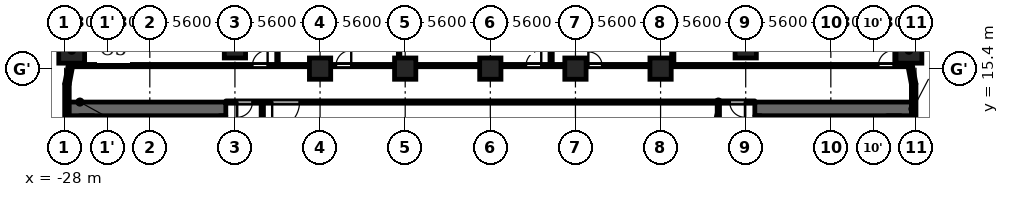
"""IFC4 building model, lengths in metres.
Left out: names, types, materials, properties, quantities, classifications, styles, units other than length and angle.
Written with IfcOpenShell. Run it as: python <this file> out.ifc"""

import sys

from ifc_helpers import new_model, si_unit, direction, frame, frame_2d, origin, origin_2d, place, context, subcontext, project, spatial, rectangle, extrude, element, fill, save


model = new_model("IFC4")
c1 = context("Model", 3, precision=1e-05, world=origin(), true_north=direction((0.0, 1.0)))
c2 = subcontext(c1, "Body", "Model", "MODEL_VIEW")
j1 = project(units=[si_unit("LENGTHUNIT", "METRE"), si_unit("PLANEANGLEUNIT", "RADIAN")], contexts=[c1])
p1 = place(None, origin())
s1 = spatial("IfcSite", under=j1, at=p1, CompositionType="ELEMENT")
p2 = place(p1, origin())
s2 = spatial("IfcBuilding", under=s1, at=p2, CompositionType="ELEMENT")
p3 = place(p2, frame((0.0, 0.0, 16.1)))
s3 = spatial("IfcBuildingStorey", under=s2, at=p3, CompositionType="ELEMENT", Elevation=16.1)
for number, where, z_axis, x_axis in (
    (1, (27.538, 16.609, 0.0), (0.0, 0.0, 1.0), (1.0, 0.0, 0.0)),
    (2, (-27.538, 16.609, 0.0), (0.0, 0.0, 1.0), (1.0, 0.0, 0.0)),
):
    element("IfcColumn", number, at=place(p3, frame(where, z_axis=z_axis, x_axis=x_axis)), inside=s3, PredefinedType="COLUMN", context=c2, shape_type="SweptSolid", body=[
        extrude(rectangle(XDim=1.7, YDim=1.7, at=origin_2d()), origin(), (0.0, 0.0, 1.0), 4.8),
    ])
for number, where, z_axis, x_axis in (
    (3, (-16.8, 16.8, 0.0), (0.0, 0.0, 1.0), (1.0, 0.0, 0.0)),
    (4, (16.8, 16.8, 0.0), (0.0, 0.0, 1.0), (1.0, 0.0, 0.0)),
    (5, (-11.2, 15.4, 0.0), (0.0, 0.0, 1.0), (1.0, 0.0, 0.0)),
    (6, (-5.6, 15.4, 0.0), (0.0, 0.0, 1.0), (1.0, 0.0, 0.0)),
    (7, (0.0, 15.4, 0.0), (0.0, 0.0, 1.0), (1.0, 0.0, 0.0)),
    (8, (5.6, 15.4, 0.0), (0.0, 0.0, 1.0), (1.0, 0.0, 0.0)),
    (9, (11.2, 15.4, 0.0), (0.0, 0.0, 1.0), (1.0, 0.0, 0.0)),
):
    element("IfcColumn", number, at=place(p3, frame(where, z_axis=z_axis, x_axis=x_axis)), inside=s3, PredefinedType="COLUMN", context=c2, shape_type="SweptSolid", body=[
        extrude(rectangle(XDim=1.4, YDim=1.4, at=origin_2d()), origin(), (0.0, 0.0, 1.0), 4.8),
    ])
p4 = place(p3, frame((27.85, 12.05, 0.0), z_axis=(0.0, 0.0, 1.0), x_axis=(0.0, 1.0, 0.0)))
e10 = element("IfcWall", 10, at=p4, inside=s3, PredefinedType="SOLIDWALL", context=c2, shape_type="SweptSolid", body=[
    extrude(rectangle(XDim=2.35, YDim=0.3, at=frame_2d((1.175, 0.0))), origin(), (0.0, 0.0, 1.0), 3.55),
])
for number, where, z_axis, x_axis in (
    (11, (27.853, 14.372, 0.0), (0.0, 0.0, 1.0), (-0.187, 0.982, 0.0)),
    (12, (-27.589, 15.753, 0.0), (0.0, 0.0, 1.0), (-0.187, -0.982, 0.0)),
):
    element("IfcWall", number, at=place(p3, frame(where, z_axis=z_axis, x_axis=x_axis)), inside=s3, PredefinedType="SOLIDWALL", context=c2, shape_type="SweptSolid", body=[
        extrude(rectangle(XDim=1.406, YDim=0.3, at=frame_2d((0.703, 0.0))), origin(), (0.0, 0.0, 1.0), 3.55),
    ])
p5 = place(p3, frame((-27.85, 14.4, 0.0), z_axis=(0.0, 0.0, 1.0), x_axis=(0.0, -1.0, 0.0)))
e13 = element("IfcWall", 13, at=p5, inside=s3, PredefinedType="SOLIDWALL", context=c2, shape_type="SweptSolid", body=[
    extrude(rectangle(XDim=2.35, YDim=0.3, at=frame_2d((1.175, 0.0))), origin(), (0.0, 0.0, 1.0), 3.55),
])
p6 = place(p3, frame((-17.4, 12.75, 0.0), z_axis=(0.0, 0.0, 1.0), x_axis=(-1.0, 0.0, 0.0)))
e14 = element("IfcWall", 14, at=p6, inside=s3, PredefinedType="SHEAR", context=c2, shape_type="SweptSolid", body=[
    extrude(rectangle(XDim=10.4, YDim=0.9, at=frame_2d((5.2, 0.0))), origin(), (0.0, 0.0, 1.0), 4.45),
])
p7 = place(p3, frame((-17.6, -12.3, 0.0), z_axis=(0.0, 0.0, 1.0), x_axis=(0.0, 1.0, 0.0)))
e15 = element("IfcWall", 15, at=p7, inside=s3, PredefinedType="SHEAR", context=c2, shape_type="SweptSolid", body=[
    extrude(rectangle(XDim=24.6, YDim=0.4, at=frame_2d((12.3, 0.0))), origin(), (0.0, 0.0, 1.0), 4.45),
])
p8 = place(p7, frame((6.0, 0.0, 0.0)))
e16 = element("IfcOpeningElement", 16, at=p8, cuts=e15, PredefinedType="OPENING", context=c2, shape_type="SweptSolid", body=[
    extrude(rectangle(XDim=1.1, YDim=2.1, at=frame_2d((0.55, 1.05))), frame((0.0, 0.21, 0.0), z_axis=(0.0, -1.0, 0.0), x_axis=(1.0, 0.0, 0.0)), (0.0, 0.0, 1.0), 0.42),
])
p9 = place(p7, frame((8.4, 0.0, 0.0)))
e17 = element("IfcOpeningElement", 17, at=p9, cuts=e15, PredefinedType="OPENING", context=c2, shape_type="SweptSolid", body=[
    extrude(rectangle(XDim=1.1, YDim=2.1, at=frame_2d((0.55, 1.05))), frame((0.0, 0.21, 0.0), z_axis=(0.0, -1.0, 0.0), x_axis=(1.0, 0.0, 0.0)), (0.0, 0.0, 1.0), 0.42),
])
p10 = place(p7, frame((10.8, 0.0, 0.0)))
e18 = element("IfcOpeningElement", 18, at=p10, cuts=e15, PredefinedType="OPENING", context=c2, shape_type="SweptSolid", body=[
    extrude(rectangle(XDim=1.1, YDim=2.1, at=frame_2d((0.55, 1.05))), frame((0.0, 0.21, 0.0), z_axis=(0.0, -1.0, 0.0), x_axis=(1.0, 0.0, 0.0)), (0.0, 0.0, 1.0), 0.42),
])
p11 = place(p7, frame((16.75, 0.0, 0.0)))
e19 = element("IfcOpeningElement", 19, at=p11, cuts=e15, PredefinedType="OPENING", context=c2, shape_type="SweptSolid", body=[
    extrude(rectangle(XDim=0.9, YDim=2.1, at=frame_2d((0.45, 1.05))), frame((0.0, 0.21, 0.0), z_axis=(0.0, -1.0, 0.0), x_axis=(1.0, 0.0, 0.0)), (0.0, 0.0, 1.0), 0.42),
])
p12 = place(p7, frame((22.8, 0.0, 0.0)))
e20 = element("IfcOpeningElement", 20, at=p12, cuts=e15, PredefinedType="OPENING", context=c2, shape_type="SweptSolid", body=[
    extrude(rectangle(XDim=1.1, YDim=2.1, at=frame_2d((0.55, 1.05))), frame((0.0, 0.21, 0.0), z_axis=(0.0, -1.0, 0.0), x_axis=(1.0, 0.0, 0.0)), (0.0, 0.0, 1.0), 0.42),
])
p13 = place(p7, frame((0.7, 0.0, 0.0)))
e21 = element("IfcOpeningElement", 21, at=p13, cuts=e15, PredefinedType="OPENING", context=c2, shape_type="SweptSolid", body=[
    extrude(rectangle(XDim=1.1, YDim=2.1, at=frame_2d((0.55, 1.05))), frame((0.0, 0.21, 0.0), z_axis=(0.0, -1.0, 0.0), x_axis=(1.0, 0.0, 0.0)), (0.0, 0.0, 1.0), 0.42),
])
p14 = place(p7, frame((12.775, 0.0, 0.0)))
e22 = element("IfcOpeningElement", 22, at=p14, cuts=e15, PredefinedType="OPENING", context=c2, shape_type="SweptSolid", body=[
    extrude(rectangle(XDim=1.8, YDim=2.1, at=frame_2d((0.9, 1.05))), frame((0.0, 0.21, 0.0), z_axis=(0.0, -1.0, 0.0), x_axis=(1.0, 0.0, 0.0)), (0.0, 0.0, 1.0), 0.42),
])
p15 = place(p3, frame((-26.55, -12.3, 0.0), z_axis=(0.0, 0.0, 1.0), x_axis=(0.0, 1.0, 0.0)))
e23 = element("IfcWall", 23, at=p15, inside=s3, PredefinedType="SHEAR", context=c2, shape_type="SweptSolid", body=[
    extrude(rectangle(XDim=24.6, YDim=0.9, at=frame_2d((12.3, 0.0))), origin(), (0.0, 0.0, 1.0), 4.45),
])
p16 = place(p3, frame((-23.55, 9.8, 0.0), z_axis=(0.0, 0.0, 1.0), x_axis=(0.0, 1.0, 0.0)))
e24 = element("IfcWall", 24, at=p16, inside=s3, PredefinedType="PARTITIONING", context=c2, shape_type="SweptSolid", body=[
    extrude(rectangle(XDim=2.5, YDim=0.2, at=frame_2d((1.25, 0.0))), origin(), (0.0, 0.0, 1.0), 4.45),
])
p17 = place(p16, frame((0.8, 0.0, 0.0)))
e25 = element("IfcOpeningElement", 25, at=p17, cuts=e24, PredefinedType="OPENING", context=c2, shape_type="SweptSolid", body=[
    extrude(rectangle(XDim=0.9, YDim=2.1, at=frame_2d((0.45, 1.05))), frame((0.0, 0.11, 0.0), z_axis=(0.0, -1.0, 0.0), x_axis=(1.0, 0.0, 0.0)), (0.0, 0.0, 1.0), 0.22),
])
p18 = place(p3, frame((17.4, 12.75, 0.0), z_axis=(0.0, 0.0, 1.0), x_axis=(1.0, 0.0, 0.0)))
e26 = element("IfcWall", 26, at=p18, inside=s3, PredefinedType="SHEAR", context=c2, shape_type="SweptSolid", body=[
    extrude(rectangle(XDim=10.4, YDim=0.9, at=frame_2d((5.2, 0.0))), origin(), (0.0, 0.0, 1.0), 4.45),
])
p19 = place(p3, frame((17.6, -12.3, 0.0), z_axis=(0.0, 0.0, 1.0), x_axis=(0.0, 1.0, 0.0)))
e27 = element("IfcWall", 27, at=p19, inside=s3, PredefinedType="SHEAR", context=c2, shape_type="SweptSolid", body=[
    extrude(rectangle(XDim=24.6, YDim=0.4, at=frame_2d((12.3, 0.0))), origin(), (0.0, 0.0, 1.0), 4.45),
])
p20 = place(p19, frame((6.0, 0.0, 0.0)))
e28 = element("IfcOpeningElement", 28, at=p20, cuts=e27, PredefinedType="OPENING", context=c2, shape_type="SweptSolid", body=[
    extrude(rectangle(XDim=1.1, YDim=2.1, at=frame_2d((0.55, 1.05))), frame((0.0, 0.21, 0.0), z_axis=(0.0, -1.0, 0.0), x_axis=(1.0, 0.0, 0.0)), (0.0, 0.0, 1.0), 0.42),
])
p21 = place(p19, frame((8.4, 0.0, 0.0)))
e29 = element("IfcOpeningElement", 29, at=p21, cuts=e27, PredefinedType="OPENING", context=c2, shape_type="SweptSolid", body=[
    extrude(rectangle(XDim=1.1, YDim=2.1, at=frame_2d((0.55, 1.05))), frame((0.0, 0.21, 0.0), z_axis=(0.0, -1.0, 0.0), x_axis=(1.0, 0.0, 0.0)), (0.0, 0.0, 1.0), 0.42),
])
p22 = place(p19, frame((10.8, 0.0, 0.0)))
e30 = element("IfcOpeningElement", 30, at=p22, cuts=e27, PredefinedType="OPENING", context=c2, shape_type="SweptSolid", body=[
    extrude(rectangle(XDim=1.1, YDim=2.1, at=frame_2d((0.55, 1.05))), frame((0.0, 0.21, 0.0), z_axis=(0.0, -1.0, 0.0), x_axis=(1.0, 0.0, 0.0)), (0.0, 0.0, 1.0), 0.42),
])
p23 = place(p19, frame((16.75, 0.0, 0.0)))
e31 = element("IfcOpeningElement", 31, at=p23, cuts=e27, PredefinedType="OPENING", context=c2, shape_type="SweptSolid", body=[
    extrude(rectangle(XDim=0.9, YDim=2.1, at=frame_2d((0.45, 1.05))), frame((0.0, 0.21, 0.0), z_axis=(0.0, -1.0, 0.0), x_axis=(1.0, 0.0, 0.0)), (0.0, 0.0, 1.0), 0.42),
])
p24 = place(p19, frame((22.8, 0.0, 0.0)))
e32 = element("IfcOpeningElement", 32, at=p24, cuts=e27, PredefinedType="OPENING", context=c2, shape_type="SweptSolid", body=[
    extrude(rectangle(XDim=1.1, YDim=2.1, at=frame_2d((0.55, 1.05))), frame((0.0, 0.21, 0.0), z_axis=(0.0, -1.0, 0.0), x_axis=(1.0, 0.0, 0.0)), (0.0, 0.0, 1.0), 0.42),
])
p25 = place(p19, frame((0.7, 0.0, 0.0)))
e33 = element("IfcOpeningElement", 33, at=p25, cuts=e27, PredefinedType="OPENING", context=c2, shape_type="SweptSolid", body=[
    extrude(rectangle(XDim=1.1, YDim=2.1, at=frame_2d((0.55, 1.05))), frame((0.0, 0.21, 0.0), z_axis=(0.0, -1.0, 0.0), x_axis=(1.0, 0.0, 0.0)), (0.0, 0.0, 1.0), 0.42),
])
p26 = place(p19, frame((12.775, 0.0, 0.0)))
e34 = element("IfcOpeningElement", 34, at=p26, cuts=e27, PredefinedType="OPENING", context=c2, shape_type="SweptSolid", body=[
    extrude(rectangle(XDim=1.8, YDim=2.1, at=frame_2d((0.9, 1.05))), frame((0.0, 0.21, 0.0), z_axis=(0.0, -1.0, 0.0), x_axis=(1.0, 0.0, 0.0)), (0.0, 0.0, 1.0), 0.42),
])
p27 = place(p3, frame((26.55, -12.3, 0.0), z_axis=(0.0, 0.0, 1.0), x_axis=(0.0, 1.0, 0.0)))
e35 = element("IfcWall", 35, at=p27, inside=s3, PredefinedType="SHEAR", context=c2, shape_type="SweptSolid", body=[
    extrude(rectangle(XDim=24.6, YDim=0.9, at=frame_2d((12.3, 0.0))), origin(), (0.0, 0.0, 1.0), 4.45),
])
p28 = place(p3, frame((23.55, 9.8, 0.0), z_axis=(0.0, 0.0, 1.0), x_axis=(0.0, 1.0, 0.0)))
e36 = element("IfcWall", 36, at=p28, inside=s3, PredefinedType="PARTITIONING", context=c2, shape_type="SweptSolid", body=[
    extrude(rectangle(XDim=2.5, YDim=0.2, at=frame_2d((1.25, 0.0))), origin(), (0.0, 0.0, 1.0), 4.45),
])
p29 = place(p28, frame((0.8, 0.0, 0.0)))
e37 = element("IfcOpeningElement", 37, at=p29, cuts=e36, PredefinedType="OPENING", context=c2, shape_type="SweptSolid", body=[
    extrude(rectangle(XDim=0.9, YDim=2.1, at=frame_2d((0.45, 1.05))), frame((0.0, 0.11, 0.0), z_axis=(0.0, -1.0, 0.0), x_axis=(1.0, 0.0, 0.0)), (0.0, 0.0, 1.0), 0.22),
])
p30 = place(p3, frame((-17.4, 13.2, 0.0), z_axis=(0.0, 0.0, 1.0), x_axis=(1.0, 0.0, 0.0)))
e38 = element("IfcWall", 38, at=p30, inside=s3, PredefinedType="PARTITIONING", context=c2, shape_type="SweptSolid", body=[
    extrude(rectangle(XDim=34.8, YDim=0.15, at=frame_2d((17.4, 0.0))), origin(), (0.0, 0.0, 1.0), 4.45),
])
p31 = place(p30, frame((3.05, 0.0, 0.0)))
e39 = element("IfcOpeningElement", 39, at=p31, cuts=e38, PredefinedType="OPENING", context=c2, shape_type="SweptSolid", body=[
    extrude(rectangle(XDim=1.8, YDim=2.1, at=frame_2d((0.9, 1.05))), frame((0.0, 0.085, 0.0), z_axis=(0.0, -1.0, 0.0), x_axis=(1.0, 0.0, 0.0)), (0.0, 0.0, 1.0), 0.17),
])
p32 = place(p30, frame((0.75, 0.0, 0.0)))
e40 = element("IfcOpeningElement", 40, at=p32, cuts=e38, PredefinedType="OPENING", context=c2, shape_type="SweptSolid", body=[
    extrude(rectangle(XDim=1.0, YDim=2.1, at=frame_2d((0.5, 1.05))), frame((0.0, 0.085, 0.0), z_axis=(0.0, -1.0, 0.0), x_axis=(1.0, 0.0, 0.0)), (0.0, 0.0, 1.0), 0.17),
])
p33 = place(p30, frame((33.15, 0.0, 0.0)))
e41 = element("IfcOpeningElement", 41, at=p33, cuts=e38, PredefinedType="OPENING", context=c2, shape_type="SweptSolid", body=[
    extrude(rectangle(XDim=1.0, YDim=2.1, at=frame_2d((0.5, 1.05))), frame((0.0, 0.085, 0.0), z_axis=(0.0, -1.0, 0.0), x_axis=(1.0, 0.0, 0.0)), (0.0, 0.0, 1.0), 0.17),
])
p34 = place(p3, frame((-27.446, 15.6, 0.0), z_axis=(0.0, 0.0, 1.0), x_axis=(1.0, 0.0, 0.0)))
e42 = element("IfcWall", 42, at=p34, inside=s3, PredefinedType="PARTITIONING", context=c2, shape_type="SweptSolid", body=[
    extrude(rectangle(XDim=54.892, YDim=0.15, at=frame_2d((27.446, 0.0))), origin(), (0.0, 0.0, 1.0), 4.45),
])
p35 = place(p34, frame((11.796, 0.0, 0.0)))
e43 = element("IfcOpeningElement", 43, at=p35, cuts=e42, PredefinedType="OPENING", context=c2, shape_type="SweptSolid", body=[
    extrude(rectangle(XDim=1.0, YDim=2.1, at=frame_2d((0.5, 1.05))), frame((0.0, 0.085, 0.0), z_axis=(0.0, -1.0, 0.0), x_axis=(1.0, 0.0, 0.0)), (0.0, 0.0, 1.0), 0.17),
])
p36 = place(p34, frame((17.296, 0.0, 0.0)))
e44 = element("IfcOpeningElement", 44, at=p36, cuts=e42, PredefinedType="OPENING", context=c2, shape_type="SweptSolid", body=[
    extrude(rectangle(XDim=1.0, YDim=2.1, at=frame_2d((0.5, 1.05))), frame((0.0, 0.085, 0.0), z_axis=(0.0, -1.0, 0.0), x_axis=(1.0, 0.0, 0.0)), (0.0, 0.0, 1.0), 0.17),
])
p37 = place(p34, frame((29.796, 0.0, 0.0)))
e45 = element("IfcOpeningElement", 45, at=p37, cuts=e42, PredefinedType="OPENING", context=c2, shape_type="SweptSolid", body=[
    extrude(rectangle(XDim=1.0, YDim=2.1, at=frame_2d((0.5, 1.05))), frame((0.0, 0.085, 0.0), z_axis=(0.0, -1.0, 0.0), x_axis=(1.0, 0.0, 0.0)), (0.0, 0.0, 1.0), 0.17),
])
p38 = place(p34, frame((33.896, 0.0, 0.0)))
e46 = element("IfcOpeningElement", 46, at=p38, cuts=e42, PredefinedType="OPENING", context=c2, shape_type="SweptSolid", body=[
    extrude(rectangle(XDim=0.9, YDim=2.1, at=frame_2d((0.45, 1.05))), frame((0.0, 0.085, 0.0), z_axis=(0.0, -1.0, 0.0), x_axis=(1.0, 0.0, 0.0)), (0.0, 0.0, 1.0), 0.17),
])
p39 = place(p34, frame((52.975, 0.0, 0.0)))
e47 = element("IfcOpeningElement", 47, at=p39, cuts=e42, PredefinedType="OPENING", context=c2, shape_type="SweptSolid", body=[
    extrude(rectangle(XDim=1.0, YDim=2.1, at=frame_2d((0.5, 1.05))), frame((0.0, 0.085, 0.0), z_axis=(0.0, -1.0, 0.0), x_axis=(1.0, 0.0, 0.0)), (0.0, 0.0, 1.0), 0.17),
])
p40 = place(p3, frame((-15.0, 6.769, 0.0), z_axis=(0.0, 0.0, 1.0), x_axis=(0.0, 1.0, 0.0)))
e48 = element("IfcWall", 48, at=p40, inside=s3, PredefinedType="PARTITIONING", context=c2, shape_type="SweptSolid", body=[
    extrude(rectangle(XDim=6.356, YDim=0.15, at=frame_2d((3.178, 0.0))), origin(), (0.0, 0.0, 1.0), 4.45),
])
p41 = place(p3, frame((-14.0, 15.675, 0.0), z_axis=(0.0, 0.0, 1.0), x_axis=(0.0, 1.0, 0.0)))
e49 = element("IfcWall", 49, at=p41, inside=s3, PredefinedType="PARTITIONING", context=c2, shape_type="SweptSolid", body=[
    extrude(rectangle(XDim=6.405, YDim=0.1, at=frame_2d((3.203, 0.0))), origin(), (0.0, 0.0, 1.0), 4.45),
])
p42 = place(p3, frame((-6.0, 15.675, 0.0), z_axis=(0.0, 0.0, 1.0), x_axis=(0.0, 1.0, 0.0)))
e50 = element("IfcWall", 50, at=p42, inside=s3, PredefinedType="PARTITIONING", context=c2, shape_type="SweptSolid", body=[
    extrude(rectangle(XDim=6.635, YDim=0.1, at=frame_2d((3.317, 0.0))), origin(), (0.0, 0.0, 1.0), 4.45),
])
p43 = place(p3, frame((4.0, 15.675, 0.0), z_axis=(0.0, 0.0, 1.0), x_axis=(0.0, 1.0, 0.0)))
e51 = element("IfcWall", 51, at=p43, inside=s3, PredefinedType="PARTITIONING", context=c2, shape_type="SweptSolid", body=[
    extrude(rectangle(XDim=6.405, YDim=0.15, at=frame_2d((3.203, 0.0))), origin(), (0.0, 0.0, 1.0), 4.45),
])
p44 = place(p3, frame((12.0, 15.675, 0.0), z_axis=(0.0, 0.0, 1.0), x_axis=(0.0, 1.0, 0.0)))
e52 = element("IfcWall", 52, at=p44, inside=s3, PredefinedType="PARTITIONING", context=c2, shape_type="SweptSolid", body=[
    extrude(rectangle(XDim=6.635, YDim=0.15, at=frame_2d((3.317, 0.0))), origin(), (0.0, 0.0, 1.0), 4.45),
])
p45 = place(p3, frame((15.0, 6.769, 0.0), z_axis=(0.0, 0.0, 1.0), x_axis=(0.0, 1.0, 0.0)))
e53 = element("IfcWall", 53, at=p45, inside=s3, PredefinedType="PARTITIONING", context=c2, shape_type="SweptSolid", body=[
    extrude(rectangle(XDim=6.356, YDim=0.15, at=frame_2d((3.178, 0.0))), origin(), (0.0, 0.0, 1.0), 4.45),
])
p46 = place(p31, origin())
e54 = element("IfcDoor", 54, at=p46, inside=s3, OperationType="SINGLE_SWING_LEFT", PredefinedType="DOOR", context=c2, shape_type="SweptSolid", body=[
    extrude(rectangle(XDim=1.8, YDim=2.1, at=frame_2d((0.9, 1.05))), frame((0.0, 0.025, 0.0), z_axis=(0.0, -1.0, 0.0), x_axis=(1.0, 0.0, 0.0)), (0.0, 0.0, 1.0), 0.05),
])
fill(e39, e54)
p47 = place(p32, origin())
e55 = element("IfcDoor", 55, at=p47, inside=s3, OperationType="SINGLE_SWING_LEFT", PredefinedType="DOOR", context=c2, shape_type="SweptSolid", body=[
    extrude(rectangle(XDim=1.0, YDim=2.1, at=frame_2d((0.5, 1.05))), frame((0.0, 0.025, 0.0), z_axis=(0.0, -1.0, 0.0), x_axis=(1.0, 0.0, 0.0)), (0.0, 0.0, 1.0), 0.05),
])
fill(e40, e55)
p48 = place(p33, origin())
e56 = element("IfcDoor", 56, at=p48, inside=s3, OperationType="SINGLE_SWING_RIGHT", PredefinedType="DOOR", context=c2, shape_type="SweptSolid", body=[
    extrude(rectangle(XDim=1.0, YDim=2.1, at=frame_2d((0.5, 1.05))), frame((0.0, 0.025, 0.0), z_axis=(0.0, -1.0, 0.0), x_axis=(1.0, 0.0, 0.0)), (0.0, 0.0, 1.0), 0.05),
])
fill(e41, e56)
p49 = place(p35, origin())
e57 = element("IfcDoor", 57, at=p49, inside=s3, OperationType="SINGLE_SWING_LEFT", PredefinedType="DOOR", context=c2, shape_type="SweptSolid", body=[
    extrude(rectangle(XDim=1.0, YDim=2.1, at=frame_2d((0.5, 1.05))), frame((0.0, 0.025, 0.0), z_axis=(0.0, -1.0, 0.0), x_axis=(1.0, 0.0, 0.0)), (0.0, 0.0, 1.0), 0.05),
])
fill(e43, e57)
p50 = place(p36, origin())
e58 = element("IfcDoor", 58, at=p50, inside=s3, OperationType="SINGLE_SWING_LEFT", PredefinedType="DOOR", context=c2, shape_type="SweptSolid", body=[
    extrude(rectangle(XDim=1.0, YDim=2.1, at=frame_2d((0.5, 1.05))), frame((0.0, 0.025, 0.0), z_axis=(0.0, -1.0, 0.0), x_axis=(1.0, 0.0, 0.0)), (0.0, 0.0, 1.0), 0.05),
])
fill(e44, e58)
p51 = place(p37, origin())
e59 = element("IfcDoor", 59, at=p51, inside=s3, OperationType="SINGLE_SWING_LEFT", PredefinedType="DOOR", context=c2, shape_type="SweptSolid", body=[
    extrude(rectangle(XDim=1.0, YDim=2.1, at=frame_2d((0.5, 1.05))), frame((0.0, 0.025, 0.0), z_axis=(0.0, -1.0, 0.0), x_axis=(1.0, 0.0, 0.0)), (0.0, 0.0, 1.0), 0.05),
])
fill(e45, e59)
p52 = place(p38, origin())
e60 = element("IfcDoor", 60, at=p52, inside=s3, OperationType="SINGLE_SWING_RIGHT", PredefinedType="DOOR", context=c2, shape_type="SweptSolid", body=[
    extrude(rectangle(XDim=0.9, YDim=2.1, at=frame_2d((0.45, 1.05))), frame((0.0, 0.025, 0.0), z_axis=(0.0, -1.0, 0.0), x_axis=(1.0, 0.0, 0.0)), (0.0, 0.0, 1.0), 0.05),
])
fill(e46, e60)
p53 = place(p39, origin())
e61 = element("IfcDoor", 61, at=p53, inside=s3, OperationType="SINGLE_SWING_LEFT", PredefinedType="DOOR", context=c2, shape_type="SweptSolid", body=[
    extrude(rectangle(XDim=1.0, YDim=2.1, at=frame_2d((0.5, 1.05))), frame((0.0, 0.025, 0.0), z_axis=(0.0, -1.0, 0.0), x_axis=(1.0, 0.0, 0.0)), (0.0, 0.0, 1.0), 0.05),
])
fill(e47, e61)
save(model, sys.argv[1])
